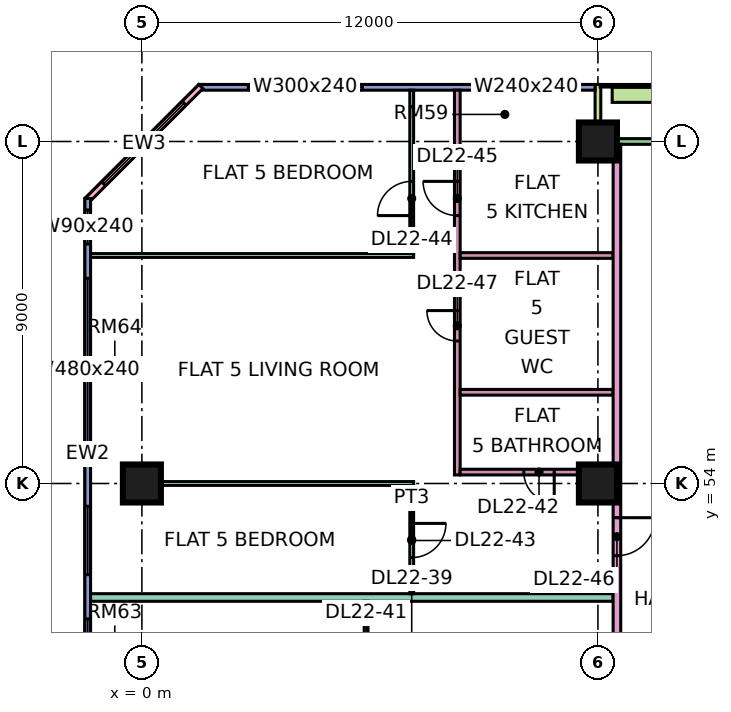
"""IFC4 building model, lengths in metres.
Left out: names, types, materials, properties, quantities, classifications, styles, units other than length and angle.
Written with IfcOpenShell. Run it as: python <this file> out.ifc"""

import sys

from ifc_helpers import new_model, si_unit, direction, frame, frame_2d, origin, origin_2d, place, context, subcontext, project, spatial, rectangle, extrude, element, fill, save


model = new_model("IFC4")
c1 = context("Model", 3, precision=1e-05, world=origin(), true_north=direction((0.0, 1.0)))
c2 = subcontext(c1, "Body", "Model", "MODEL_VIEW")
j1 = project(units=[si_unit("LENGTHUNIT", "METRE"), si_unit("PLANEANGLEUNIT", "RADIAN")], contexts=[c1])
p1 = place(None, origin())
s1 = spatial("IfcSite", under=j1, at=p1, CompositionType="ELEMENT")
p2 = place(p1, origin())
s2 = spatial("IfcBuilding", under=s1, at=p2, CompositionType="ELEMENT")
p3 = place(p2, frame((0.0, 0.0, 99.4)))
s3 = spatial("IfcBuildingStorey", under=s2, at=p3, CompositionType="ELEMENT", Elevation=99.4)
p4 = place(p3, frame((0.0, 54.0, 0.0), z_axis=(0.0, 0.0, 1.0), x_axis=(1.0, 0.0, 0.0)))
e1 = element("IfcColumn", 1, at=p4, inside=s3, PredefinedType="COLUMN", context=c2, shape_type="SweptSolid", body=[
    extrude(rectangle(XDim=1.0, YDim=1.0, at=origin_2d()), origin(), (0.0, 0.0, 1.0), 3.75),
])
for number, where, z_axis, x_axis in (
    (2, (12.0, 54.0, 0.0), (0.0, 0.0, 1.0), (1.0, 0.0, 0.0)),
    (3, (12.0, 63.0, 0.0), (0.0, 0.0, 1.0), (1.0, 0.0, 0.0)),
):
    element("IfcColumn", number, at=place(p3, frame(where, z_axis=z_axis, x_axis=x_axis)), inside=s3, PredefinedType="COLUMN", context=c2, shape_type="SweptSolid", body=[
        extrude(rectangle(XDim=1.0, YDim=1.0, at=origin_2d()), origin(), (0.0, 0.0, 1.0), 3.75),
    ])
p5 = place(p3, frame((22.425, 63.0, 0.0), z_axis=(0.0, 0.0, 1.0), x_axis=(-1.0, 0.0, 0.0)))
e4 = element("IfcWall", 4, at=p5, inside=s3, PredefinedType="SOLIDWALL", context=c2, shape_type="SweptSolid", body=[
    extrude(rectangle(XDim=10.35, YDim=0.15, at=frame_2d((5.175, 0.0))), origin(), (0.0, 0.0, 1.0), 3.35),
])
p6 = place(p5, frame((0.562, 0.0, 0.45)))
e5 = element("IfcOpeningElement", 5, at=p6, cuts=e4, PredefinedType="OPENING", context=c2, shape_type="SweptSolid", body=[
    extrude(rectangle(XDim=1.8, YDim=2.4, at=frame_2d((0.9, 1.2))), frame((0.0, 0.085, 0.0), z_axis=(0.0, -1.0, 0.0), x_axis=(1.0, 0.0, 0.0)), (0.0, 0.0, 1.0), 0.17),
])
p7 = place(p5, frame((3.975, 0.0, 0.0)))
e6 = element("IfcOpeningElement", 6, at=p7, cuts=e4, PredefinedType="OPENING", context=c2, shape_type="SweptSolid", body=[
    extrude(rectangle(XDim=1.8, YDim=2.4, at=frame_2d((0.9, 1.2))), frame((0.0, 0.085, 0.0), z_axis=(0.0, -1.0, 0.0), x_axis=(1.0, 0.0, 0.0)), (0.0, 0.0, 1.0), 0.17),
])
p8 = place(p3, frame((12.0, 64.5, 0.0), z_axis=(0.0, 0.0, 1.0), x_axis=(0.0, -1.0, 0.0)))
e7 = element("IfcWall", 7, at=p8, inside=s3, PredefinedType="SOLIDWALL", context=c2, shape_type="SweptSolid", body=[
    extrude(rectangle(XDim=1.5, YDim=0.15, at=frame_2d((0.75, 0.0))), origin(), (0.0, 0.0, 1.0), 3.35),
])
p9 = place(p3, frame((11.925, 64.425, 0.0), z_axis=(0.0, 0.0, 1.0), x_axis=(-1.0, 0.0, 0.0)))
e8 = element("IfcWall", 8, at=p9, inside=s3, PredefinedType="SOLIDWALL", context=c2, shape_type="SweptSolid", body=[
    extrude(rectangle(XDim=10.425, YDim=0.15, at=frame_2d((5.212, 0.0))), origin(), (0.0, 0.0, 1.0), 3.35),
])
p10 = place(p9, frame((0.613, 0.0, 0.45)))
e9 = element("IfcOpeningElement", 9, at=p10, cuts=e8, PredefinedType="OPENING", context=c2, shape_type="SweptSolid", body=[
    extrude(rectangle(XDim=2.4, YDim=2.4, at=frame_2d((1.2, 1.2))), frame((0.0, 0.085, 0.0), z_axis=(0.0, -1.0, 0.0), x_axis=(1.0, 0.0, 0.0)), (0.0, 0.0, 1.0), 0.17),
])
p11 = place(p9, frame((6.125, 0.0, 0.45)))
e10 = element("IfcOpeningElement", 10, at=p11, cuts=e8, PredefinedType="OPENING", context=c2, shape_type="SweptSolid", body=[
    extrude(rectangle(XDim=3.0, YDim=2.4, at=frame_2d((1.5, 1.2))), frame((0.0, 0.085, 0.0), z_axis=(0.0, -1.0, 0.0), x_axis=(1.0, 0.0, 0.0)), (0.0, 0.0, 1.0), 0.17),
])
p12 = place(p3, frame((1.553, 64.447, 0.0), z_axis=(0.0, 0.0, 1.0), x_axis=(-0.707106781187, -0.707106781187, 0.0)))
e11 = element("IfcWall", 11, at=p12, inside=s3, PredefinedType="SOLIDWALL", context=c2, shape_type="SweptSolid", body=[
    extrude(rectangle(XDim=4.243, YDim=0.15, at=frame_2d((2.121, 0.0))), origin(), (0.0, 0.0, 1.0), 3.35),
])
p13 = place(p12, frame((0.621, 0.0, 0.45)))
e12 = element("IfcOpeningElement", 12, at=p13, cuts=e11, PredefinedType="OPENING", context=c2, shape_type="SweptSolid", body=[
    extrude(rectangle(XDim=3.0, YDim=2.4, at=frame_2d((1.5, 1.2))), frame((0.0, 0.085, 0.0), z_axis=(0.0, -1.0, 0.0), x_axis=(1.0, 0.0, 0.0)), (0.0, 0.0, 1.0), 0.17),
])
p14 = place(p3, frame((-1.425, 61.5, 0.0), z_axis=(0.0, 0.0, 1.0), x_axis=(0.0, -1.0, 0.0)))
e13 = element("IfcWall", 13, at=p14, inside=s3, PredefinedType="SOLIDWALL", context=c2, shape_type="SweptSolid", body=[
    extrude(rectangle(XDim=13.425, YDim=0.15, at=frame_2d((6.712, 0.0))), origin(), (0.0, 0.0, 1.0), 3.35),
])
p15 = place(p14, frame((0.3, 0.0, 0.45)))
e14 = element("IfcOpeningElement", 14, at=p15, cuts=e13, PredefinedType="OPENING", context=c2, shape_type="SweptSolid", body=[
    extrude(rectangle(XDim=0.9, YDim=2.4, at=frame_2d((0.45, 1.2))), frame((0.0, 0.085, 0.0), z_axis=(0.0, -1.0, 0.0), x_axis=(1.0, 0.0, 0.0)), (0.0, 0.0, 1.0), 0.17),
])
p16 = place(p14, frame((2.1, 0.0, 0.45)))
e15 = element("IfcOpeningElement", 15, at=p16, cuts=e13, PredefinedType="OPENING", context=c2, shape_type="SweptSolid", body=[
    extrude(rectangle(XDim=4.8, YDim=2.4, at=frame_2d((2.4, 1.2))), frame((0.0, 0.085, 0.0), z_axis=(0.0, -1.0, 0.0), x_axis=(1.0, 0.0, 0.0)), (0.0, 0.0, 1.0), 0.17),
])
p17 = place(p14, frame((8.1, 0.0, 0.45)))
e16 = element("IfcOpeningElement", 16, at=p17, cuts=e13, PredefinedType="OPENING", context=c2, shape_type="SweptSolid", body=[
    extrude(rectangle(XDim=1.8, YDim=2.4, at=frame_2d((0.9, 1.2))), frame((0.0, 0.085, 0.0), z_axis=(0.0, -1.0, 0.0), x_axis=(1.0, 0.0, 0.0)), (0.0, 0.0, 1.0), 0.17),
])
p18 = place(p14, frame((11.062, 0.0, 0.45)))
e17 = element("IfcOpeningElement", 17, at=p18, cuts=e13, PredefinedType="OPENING", context=c2, shape_type="SweptSolid", body=[
    extrude(rectangle(XDim=1.8, YDim=2.4, at=frame_2d((0.9, 1.2))), frame((0.0, 0.085, 0.0), z_axis=(0.0, -1.0, 0.0), x_axis=(1.0, 0.0, 0.0)), (0.0, 0.0, 1.0), 0.17),
])
p19 = place(p3, frame((22.125, 64.229, 0.0), z_axis=(0.0, 0.0, 1.0), x_axis=(-1.0, 0.0, 0.0)))
e18 = element("IfcWall", 18, at=p19, inside=s3, PredefinedType="SOLIDWALL", context=c2, shape_type="SweptSolid", body=[
    extrude(rectangle(XDim=9.75, YDim=0.4, at=frame_2d((4.875, 0.0))), origin(), (0.0, 0.0, 1.0), 0.7),
])
p20 = place(p3, frame((-1.35, 51.0, 0.0), z_axis=(0.0, 0.0, 1.0), x_axis=(1.0, 0.0, 0.0)))
e19 = element("IfcWall", 19, at=p20, inside=s3, PredefinedType="PARTITIONING", context=c2, shape_type="SweptSolid", body=[
    extrude(rectangle(XDim=13.75, YDim=0.2, at=frame_2d((6.875, 0.0))), origin(), (0.0, 0.0, 1.0), 3.35),
])
e20 = element("IfcWall", 20, at=p4, inside=s3, PredefinedType="PARTITIONING", context=c2, shape_type="SweptSolid", body=[
    extrude(rectangle(XDim=7.15, YDim=0.1, at=frame_2d((3.575, 0.0))), origin(), (0.0, 0.0, 1.0), 3.35),
])
p21 = place(p3, frame((-1.35, 60.0, 0.0), z_axis=(0.0, 0.0, 1.0), x_axis=(1.0, 0.0, 0.0)))
e21 = element("IfcWall", 21, at=p21, inside=s3, PredefinedType="PARTITIONING", context=c2, shape_type="SweptSolid", body=[
    extrude(rectangle(XDim=8.5, YDim=0.1, at=frame_2d((4.25, 0.0))), origin(), (0.0, 0.0, 1.0), 3.35),
])
p22 = place(p3, frame((5.9, 38.95, 0.0), z_axis=(0.0, 0.0, 1.0), x_axis=(0.0, 1.0, 0.0)))
e22 = element("IfcWall", 22, at=p22, inside=s3, PredefinedType="PARTITIONING", context=c2, shape_type="SweptSolid", body=[
    extrude(rectangle(XDim=11.95, YDim=0.1, at=frame_2d((5.975, 0.0))), origin(), (0.0, 0.0, 1.0), 3.35),
])
p23 = place(p22, frame((1.1, 0.0, 0.0)))
e23 = element("IfcOpeningElement", 23, at=p23, cuts=e22, PredefinedType="OPENING", context=c2, shape_type="SweptSolid", body=[
    extrude(rectangle(XDim=0.9, YDim=2.1, at=frame_2d((0.45, 1.05))), frame((0.0, 0.06, 0.0), z_axis=(0.0, -1.0, 0.0), x_axis=(1.0, 0.0, 0.0)), (0.0, 0.0, 1.0), 0.12),
])
p24 = place(p22, frame((4.1, 0.0, 0.0)))
e24 = element("IfcOpeningElement", 24, at=p24, cuts=e22, PredefinedType="OPENING", context=c2, shape_type="SweptSolid", body=[
    extrude(rectangle(XDim=0.9, YDim=2.1, at=frame_2d((0.45, 1.05))), frame((0.0, 0.06, 0.0), z_axis=(0.0, -1.0, 0.0), x_axis=(1.0, 0.0, 0.0)), (0.0, 0.0, 1.0), 0.12),
])
p25 = place(p22, frame((7.1, 0.0, 0.0)))
e25 = element("IfcOpeningElement", 25, at=p25, cuts=e22, PredefinedType="OPENING", context=c2, shape_type="SweptSolid", body=[
    extrude(rectangle(XDim=0.9, YDim=2.1, at=frame_2d((0.45, 1.05))), frame((0.0, 0.06, 0.0), z_axis=(0.0, -1.0, 0.0), x_axis=(1.0, 0.0, 0.0)), (0.0, 0.0, 1.0), 0.12),
])
p26 = place(p22, frame((10.1, 0.0, 0.0)))
e26 = element("IfcOpeningElement", 26, at=p26, cuts=e22, PredefinedType="OPENING", context=c2, shape_type="SweptSolid", body=[
    extrude(rectangle(XDim=0.9, YDim=2.1, at=frame_2d((0.45, 1.05))), frame((0.0, 0.06, 0.0), z_axis=(0.0, -1.0, 0.0), x_axis=(1.0, 0.0, 0.0)), (0.0, 0.0, 1.0), 0.12),
])
p27 = place(p3, frame((7.1, 51.1, 0.0), z_axis=(0.0, 0.0, 1.0), x_axis=(0.0, 1.0, 0.0)))
e27 = element("IfcWall", 27, at=p27, inside=s3, PredefinedType="PARTITIONING", context=c2, shape_type="SweptSolid", body=[
    extrude(rectangle(XDim=2.85, YDim=0.1, at=frame_2d((1.425, 0.0))), origin(), (0.0, 0.0, 1.0), 3.35),
])
p28 = place(p27, frame((0.95, 0.0, 0.0)))
e28 = element("IfcOpeningElement", 28, at=p28, cuts=e27, PredefinedType="OPENING", context=c2, shape_type="SweptSolid", body=[
    extrude(rectangle(XDim=0.9, YDim=2.1, at=frame_2d((0.45, 1.05))), frame((0.0, 0.06, 0.0), z_axis=(0.0, -1.0, 0.0), x_axis=(1.0, 0.0, 0.0)), (0.0, 0.0, 1.0), 0.12),
])
p29 = place(p3, frame((7.1, 60.05, 0.0), z_axis=(0.0, 0.0, 1.0), x_axis=(0.0, 1.0, 0.0)))
e29 = element("IfcWall", 29, at=p29, inside=s3, PredefinedType="PARTITIONING", context=c2, shape_type="SweptSolid", body=[
    extrude(rectangle(XDim=4.3, YDim=0.1, at=frame_2d((2.15, 0.0))), origin(), (0.0, 0.0, 1.0), 3.35),
])
p30 = place(p29, frame((1.0, 0.0, 0.0)))
e30 = element("IfcOpeningElement", 30, at=p30, cuts=e29, PredefinedType="OPENING", context=c2, shape_type="SweptSolid", body=[
    extrude(rectangle(XDim=0.9, YDim=2.1, at=frame_2d((0.45, 1.05))), frame((0.0, 0.06, 0.0), z_axis=(0.0, -1.0, 0.0), x_axis=(1.0, 0.0, 0.0)), (0.0, 0.0, 1.0), 0.12),
])
p31 = place(p3, frame((8.3, 54.225, 0.0), z_axis=(0.0, 0.0, 1.0), x_axis=(0.0, 1.0, 0.0)))
e31 = element("IfcWall", 31, at=p31, inside=s3, PredefinedType="PARTITIONING", context=c2, shape_type="SweptSolid", body=[
    extrude(rectangle(XDim=10.125, YDim=0.15, at=frame_2d((5.062, 0.0))), origin(), (0.0, 0.0, 1.0), 3.35),
])
p32 = place(p31, frame((6.825, 0.0, 0.0)))
e32 = element("IfcOpeningElement", 32, at=p32, cuts=e31, PredefinedType="OPENING", context=c2, shape_type="SweptSolid", body=[
    extrude(rectangle(XDim=0.9, YDim=2.1, at=frame_2d((0.45, 1.05))), frame((0.0, 0.085, 0.0), z_axis=(0.0, -1.0, 0.0), x_axis=(1.0, 0.0, 0.0)), (0.0, 0.0, 1.0), 0.17),
])
p33 = place(p31, frame((3.525, 0.0, 0.0)))
e33 = element("IfcOpeningElement", 33, at=p33, cuts=e31, PredefinedType="OPENING", context=c2, shape_type="SweptSolid", body=[
    extrude(rectangle(XDim=0.8, YDim=2.1, at=frame_2d((0.4, 1.05))), frame((0.0, 0.085, 0.0), z_axis=(0.0, -1.0, 0.0), x_axis=(1.0, 0.0, 0.0)), (0.0, 0.0, 1.0), 0.17),
])
p34 = place(p3, frame((8.375, 54.3, 0.0), z_axis=(0.0, 0.0, 1.0), x_axis=(1.0, 0.0, 0.0)))
e34 = element("IfcWall", 34, at=p34, inside=s3, PredefinedType="PARTITIONING", context=c2, shape_type="SweptSolid", body=[
    extrude(rectangle(XDim=4.025, YDim=0.15, at=frame_2d((2.012, 0.0))), origin(), (0.0, 0.0, 1.0), 3.35),
])
p35 = place(p34, frame((1.675, 0.0, 0.0)))
e35 = element("IfcOpeningElement", 35, at=p35, cuts=e34, PredefinedType="OPENING", context=c2, shape_type="SweptSolid", body=[
    extrude(rectangle(XDim=0.8, YDim=2.1, at=frame_2d((0.4, 1.05))), frame((0.0, 0.085, 0.0), z_axis=(0.0, -1.0, 0.0), x_axis=(1.0, 0.0, 0.0)), (0.0, 0.0, 1.0), 0.17),
])
for number, where, z_axis, x_axis in (
    (36, (8.375, 56.4, 0.0), (0.0, 0.0, 1.0), (1.0, 0.0, 0.0)),
    (37, (8.375, 60.0, 0.0), (0.0, 0.0, 1.0), (1.0, 0.0, 0.0)),
):
    element("IfcWall", number, at=place(p3, frame(where, z_axis=z_axis, x_axis=x_axis)), inside=s3, PredefinedType="PARTITIONING", context=c2, shape_type="SweptSolid", body=[
        extrude(rectangle(XDim=4.025, YDim=0.15, at=frame_2d((2.012, 0.0))), origin(), (0.0, 0.0, 1.0), 3.35),
    ])
p36 = place(p3, frame((12.5, 20.0, 0.0), z_axis=(0.0, 0.0, 1.0), x_axis=(0.0, 1.0, 0.0)))
e38 = element("IfcWall", 38, at=p36, inside=s3, PredefinedType="PARTITIONING", context=c2, shape_type="SweptSolid", body=[
    extrude(rectangle(XDim=42.926, YDim=0.2, at=frame_2d((21.463, 0.0))), origin(), (0.0, 0.0, 1.0), 3.35),
])
p37 = place(p36, frame((28.65, 0.0, 0.0)))
e39 = element("IfcOpeningElement", 39, at=p37, cuts=e38, PredefinedType="OPENING", context=c2, shape_type="SweptSolid", body=[
    extrude(rectangle(XDim=1.0, YDim=2.1, at=frame_2d((0.5, 1.05))), frame((0.0, 0.11, 0.0), z_axis=(0.0, -1.0, 0.0), x_axis=(1.0, 0.0, 0.0)), (0.0, 0.0, 1.0), 0.22),
])
p38 = place(p36, frame((32.1, 0.0, 0.0)))
e40 = element("IfcOpeningElement", 40, at=p38, cuts=e38, PredefinedType="OPENING", context=c2, shape_type="SweptSolid", body=[
    extrude(rectangle(XDim=1.0, YDim=2.1, at=frame_2d((0.5, 1.05))), frame((0.0, 0.11, 0.0), z_axis=(0.0, -1.0, 0.0), x_axis=(1.0, 0.0, 0.0)), (0.0, 0.0, 1.0), 0.22),
])
p39 = place(p36, frame((0.6, 0.0, 0.0)))
e41 = element("IfcOpeningElement", 41, at=p39, cuts=e38, PredefinedType="OPENING", context=c2, shape_type="SweptSolid", body=[
    extrude(rectangle(XDim=1.2, YDim=2.1, at=frame_2d((0.6, 1.05))), frame((0.0, 0.11, 0.0), z_axis=(0.0, -1.0, 0.0), x_axis=(1.0, 0.0, 0.0)), (0.0, 0.0, 1.0), 0.22),
])
p40 = place(p36, frame((13.95, 0.0, 0.0)))
e42 = element("IfcOpeningElement", 42, at=p40, cuts=e38, PredefinedType="OPENING", context=c2, shape_type="SweptSolid", body=[
    extrude(rectangle(XDim=1.0, YDim=2.1, at=frame_2d((0.5, 1.05))), frame((0.0, 0.11, 0.0), z_axis=(0.0, -1.0, 0.0), x_axis=(1.0, 0.0, 0.0)), (0.0, 0.0, 1.0), 0.22),
])
p41 = place(p10, origin())
e43 = element("IfcWindow", 43, at=p41, inside=s3, PartitioningType="SINGLE_PANEL", PredefinedType="WINDOW", context=c2, shape_type="SweptSolid", body=[
    extrude(rectangle(XDim=2.4, YDim=2.4, at=frame_2d((1.2, 1.2))), frame((0.0, 0.03, 0.0), z_axis=(0.0, -1.0, 0.0), x_axis=(1.0, 0.0, 0.0)), (0.0, 0.0, 1.0), 0.06),
])
fill(e9, e43)
p42 = place(p11, origin())
e44 = element("IfcWindow", 44, at=p42, inside=s3, PartitioningType="SINGLE_PANEL", PredefinedType="WINDOW", context=c2, shape_type="SweptSolid", body=[
    extrude(rectangle(XDim=3.0, YDim=2.4, at=frame_2d((1.5, 1.2))), frame((0.0, 0.03, 0.0), z_axis=(0.0, -1.0, 0.0), x_axis=(1.0, 0.0, 0.0)), (0.0, 0.0, 1.0), 0.06),
])
fill(e10, e44)
p43 = place(p13, origin())
e45 = element("IfcWindow", 45, at=p43, inside=s3, PartitioningType="SINGLE_PANEL", PredefinedType="WINDOW", context=c2, shape_type="SweptSolid", body=[
    extrude(rectangle(XDim=3.0, YDim=2.4, at=frame_2d((1.5, 1.2))), frame((0.0, 0.03, 0.0), z_axis=(0.0, -1.0, 0.0), x_axis=(1.0, 0.0, 0.0)), (0.0, 0.0, 1.0), 0.06),
])
fill(e12, e45)
p44 = place(p15, origin())
e46 = element("IfcWindow", 46, at=p44, inside=s3, PartitioningType="SINGLE_PANEL", PredefinedType="WINDOW", context=c2, shape_type="SweptSolid", body=[
    extrude(rectangle(XDim=0.9, YDim=2.4, at=frame_2d((0.45, 1.2))), frame((0.0, 0.03, 0.0), z_axis=(0.0, -1.0, 0.0), x_axis=(1.0, 0.0, 0.0)), (0.0, 0.0, 1.0), 0.06),
])
fill(e14, e46)
p45 = place(p16, origin())
e47 = element("IfcWindow", 47, at=p45, inside=s3, PartitioningType="SINGLE_PANEL", PredefinedType="WINDOW", context=c2, shape_type="SweptSolid", body=[
    extrude(rectangle(XDim=4.8, YDim=2.4, at=frame_2d((2.4, 1.2))), frame((0.0, 0.03, 0.0), z_axis=(0.0, -1.0, 0.0), x_axis=(1.0, 0.0, 0.0)), (0.0, 0.0, 1.0), 0.06),
])
fill(e15, e47)
p46 = place(p17, origin())
e48 = element("IfcWindow", 48, at=p46, inside=s3, PartitioningType="SINGLE_PANEL", PredefinedType="WINDOW", context=c2, shape_type="SweptSolid", body=[
    extrude(rectangle(XDim=1.8, YDim=2.4, at=frame_2d((0.9, 1.2))), frame((0.0, 0.03, 0.0), z_axis=(0.0, -1.0, 0.0), x_axis=(1.0, 0.0, 0.0)), (0.0, 0.0, 1.0), 0.06),
])
fill(e16, e48)
p47 = place(p18, origin())
e49 = element("IfcWindow", 49, at=p47, inside=s3, PartitioningType="SINGLE_PANEL", PredefinedType="WINDOW", context=c2, shape_type="SweptSolid", body=[
    extrude(rectangle(XDim=1.8, YDim=2.4, at=frame_2d((0.9, 1.2))), frame((0.0, 0.03, 0.0), z_axis=(0.0, -1.0, 0.0), x_axis=(1.0, 0.0, 0.0)), (0.0, 0.0, 1.0), 0.06),
])
fill(e17, e49)
p48 = place(p35, origin())
e50 = element("IfcDoor", 50, at=p48, inside=s3, OperationType="SINGLE_SWING_RIGHT", PredefinedType="DOOR", context=c2, shape_type="SweptSolid", body=[
    extrude(rectangle(XDim=0.8, YDim=2.1, at=frame_2d((0.4, 1.05))), frame((0.0, 0.025, 0.0), z_axis=(0.0, -1.0, 0.0), x_axis=(1.0, 0.0, 0.0)), (0.0, 0.0, 1.0), 0.05),
])
fill(e35, e50)
p49 = place(p28, origin())
e51 = element("IfcDoor", 51, at=p49, inside=s3, OperationType="SINGLE_SWING_RIGHT", PredefinedType="DOOR", context=c2, shape_type="SweptSolid", body=[
    extrude(rectangle(XDim=0.9, YDim=2.1, at=frame_2d((0.45, 1.05))), frame((0.0, 0.025, 0.0), z_axis=(0.0, -1.0, 0.0), x_axis=(1.0, 0.0, 0.0)), (0.0, 0.0, 1.0), 0.05),
])
fill(e28, e51)
p50 = place(p30, origin())
e52 = element("IfcDoor", 52, at=p50, inside=s3, OperationType="SINGLE_SWING_LEFT", PredefinedType="DOOR", context=c2, shape_type="SweptSolid", body=[
    extrude(rectangle(XDim=0.9, YDim=2.1, at=frame_2d((0.45, 1.05))), frame((0.0, 0.025, 0.0), z_axis=(0.0, -1.0, 0.0), x_axis=(1.0, 0.0, 0.0)), (0.0, 0.0, 1.0), 0.05),
])
fill(e30, e52)
p51 = place(p32, frame((0.9, 0.0, 0.0), z_axis=(0.0, 0.0, 1.0), x_axis=(-1.0, 0.0, 0.0)))
e53 = element("IfcDoor", 53, at=p51, inside=s3, OperationType="SINGLE_SWING_RIGHT", PredefinedType="DOOR", context=c2, shape_type="SweptSolid", body=[
    extrude(rectangle(XDim=0.9, YDim=2.1, at=frame_2d((0.45, 1.05))), frame((0.0, 0.025, 0.0), z_axis=(0.0, -1.0, 0.0), x_axis=(1.0, 0.0, 0.0)), (0.0, 0.0, 1.0), 0.05),
])
fill(e32, e53)
p52 = place(p38, origin())
e54 = element("IfcDoor", 54, at=p52, inside=s3, OperationType="SINGLE_SWING_RIGHT", PredefinedType="DOOR", context=c2, shape_type="SweptSolid", body=[
    extrude(rectangle(XDim=1.0, YDim=2.1, at=frame_2d((0.5, 1.05))), frame((0.0, 0.025, 0.0), z_axis=(0.0, -1.0, 0.0), x_axis=(1.0, 0.0, 0.0)), (0.0, 0.0, 1.0), 0.05),
])
fill(e40, e54)
p53 = place(p33, frame((0.8, 0.0, 0.0), z_axis=(0.0, 0.0, 1.0), x_axis=(-1.0, 0.0, 0.0)))
e55 = element("IfcDoor", 55, at=p53, inside=s3, OperationType="SINGLE_SWING_RIGHT", PredefinedType="DOOR", context=c2, shape_type="SweptSolid", body=[
    extrude(rectangle(XDim=0.8, YDim=2.1, at=frame_2d((0.4, 1.05))), frame((0.0, 0.025, 0.0), z_axis=(0.0, -1.0, 0.0), x_axis=(1.0, 0.0, 0.0)), (0.0, 0.0, 1.0), 0.05),
])
fill(e33, e55)
save(model, sys.argv[1])
